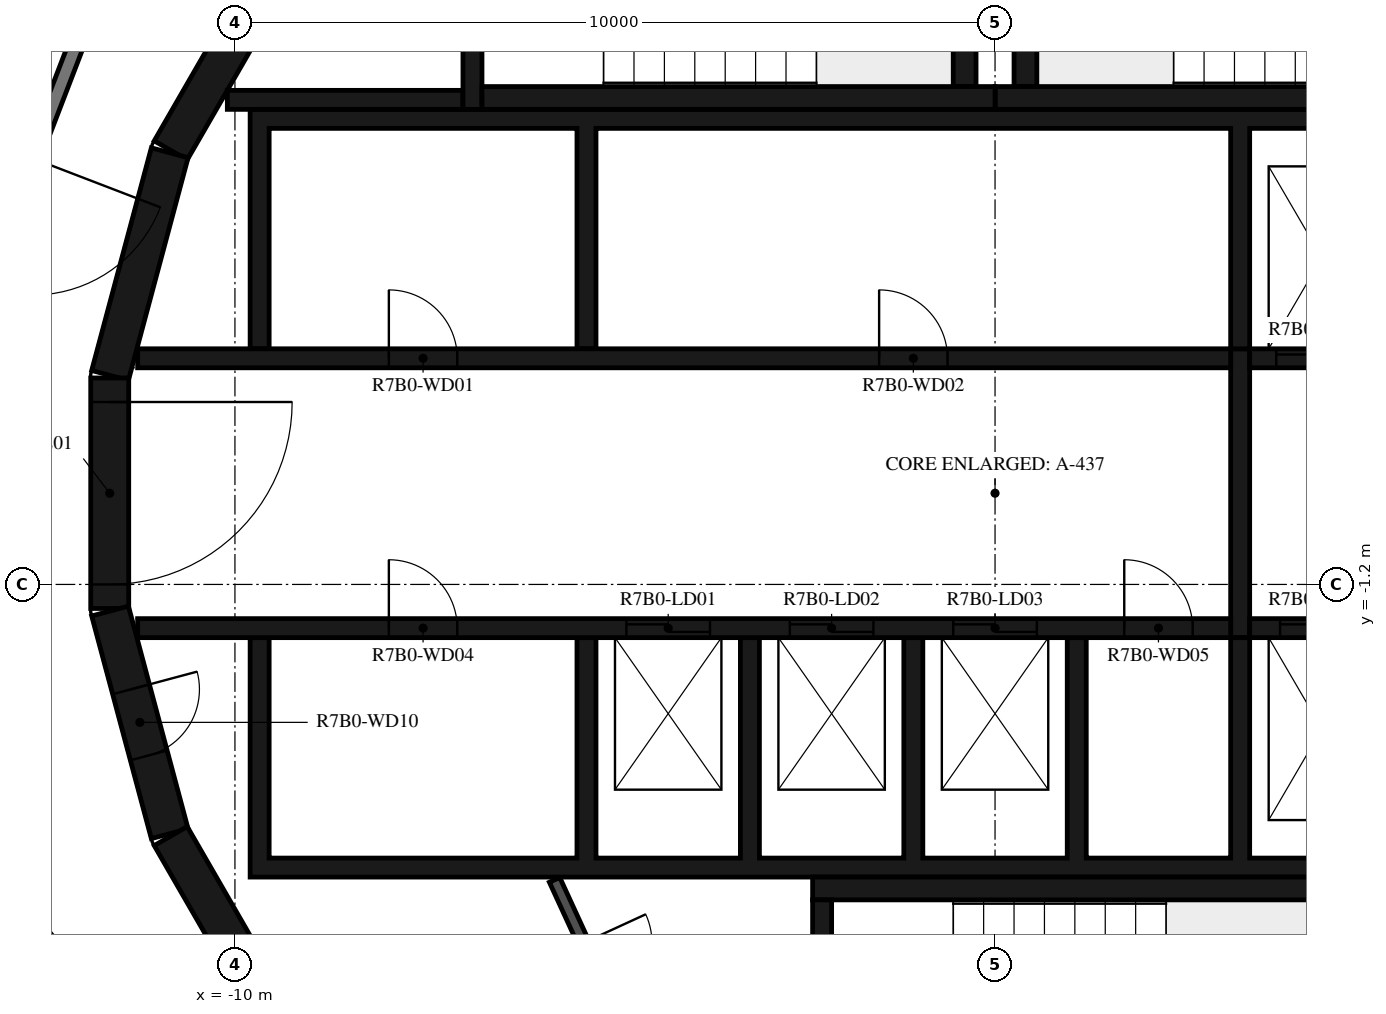
"""IFC4 building model, lengths in metres.
Left out: names, types, materials, properties, quantities, classifications, styles, units other than length and angle.
Written with IfcOpenShell. Run it as: python <this file> out.ifc"""

import sys

from ifc_helpers import new_model, si_unit, direction, frame, frame_2d, origin, place, context, subcontext, project, spatial, polyline, rectangle, outline, extrude, element, fill, save


model = new_model("IFC4")
c1 = context("Model", 3, precision=1e-05, world=origin(), true_north=direction((0.0, 1.0)))
c2 = subcontext(c1, "Body", "Model", "MODEL_VIEW")
j1 = project(units=[si_unit("LENGTHUNIT", "METRE"), si_unit("PLANEANGLEUNIT", "RADIAN")], contexts=[c1])
p1 = place(None, origin())
s1 = spatial("IfcSite", under=j1, at=p1, CompositionType="ELEMENT")
p2 = place(p1, origin())
s2 = spatial("IfcBuilding", under=s1, at=p2, CompositionType="ELEMENT")
p3 = place(p2, frame((0.0, 0.0, 277.4)))
s3 = spatial("IfcBuildingStorey", under=s2, at=p3, CompositionType="ELEMENT", Elevation=277.4)
for number, where, z_axis, x_axis in (
    (1, (-9.329, 7.137, 0.0), (0.0, 0.0, 1.0), (-0.5, -0.866, 0.0)),
    (2, (-10.858, 4.479, 0.0), (0.0, 0.0, 1.0), (-0.259, -0.966, 0.0)),
):
    element("IfcWall", number, at=place(p3, frame(where, z_axis=z_axis, x_axis=x_axis)), inside=s3, PredefinedType="SHEAR", context=c2, shape_type="SweptSolid", body=[
        extrude(rectangle(XDim=3.033, YDim=0.5, at=frame_2d((1.516, 0.0))), origin(), (0.0, 0.0, 1.0), 3.12),
    ])
p4 = place(p3, frame((-11.647, 1.516, 0.0), z_axis=(0.0, 0.0, 1.0), x_axis=(0.0, -1.0, 0.0)))
e3 = element("IfcWall", 3, at=p4, inside=s3, PredefinedType="SHEAR", context=c2, shape_type="SweptSolid", body=[
    extrude(rectangle(XDim=3.033, YDim=0.5, at=frame_2d((1.516, 0.0))), origin(), (0.0, 0.0, 1.0), 3.12),
])
p5 = place(p4, frame((0.316, 0.0, 0.0)))
e4 = element("IfcOpeningElement", 4, at=p5, cuts=e3, PredefinedType="OPENING", context=c2, shape_type="SweptSolid", body=[
    extrude(rectangle(XDim=2.4, YDim=2.1, at=frame_2d((1.2, 1.05))), frame((0.0, 0.26, 0.0), z_axis=(0.0, -1.0, 0.0), x_axis=(1.0, 0.0, 0.0)), (0.0, 0.0, 1.0), 0.52),
])
p6 = place(p3, frame((-11.643, -1.55, 0.0), z_axis=(0.0, 0.0, 1.0), x_axis=(0.258734743916, -0.965948410781, 0.0)))
e5 = element("IfcWall", 5, at=p6, inside=s3, PredefinedType="SHEAR", context=c2, shape_type="SweptSolid", body=[
    extrude(rectangle(XDim=3.033, YDim=0.5, at=frame_2d((1.516, 0.0))), origin(), (0.0, 0.0, 1.0), 3.12),
])
p7 = place(p6, frame((1.066, 0.0, 0.0)))
e6 = element("IfcOpeningElement", 6, at=p7, cuts=e5, PredefinedType="OPENING", context=c2, shape_type="SweptSolid", body=[
    extrude(rectangle(XDim=0.9, YDim=2.1, at=frame_2d((0.45, 1.05))), frame((0.0, 0.26, 0.0), z_axis=(0.0, -1.0, 0.0), x_axis=(1.0, 0.0, 0.0)), (0.0, 0.0, 1.0), 0.52),
])
p8 = place(p3, frame((-10.845, -4.51, 0.0), z_axis=(0.0, 0.0, 1.0), x_axis=(0.500087131594, -0.865975092491, 0.0)))
e7 = element("IfcWall", 7, at=p8, inside=s3, PredefinedType="SHEAR", context=c2, shape_type="SweptSolid", body=[
    extrude(rectangle(XDim=3.033, YDim=0.5, at=frame_2d((1.516, 0.0))), origin(), (0.0, 0.0, 1.0), 3.12),
])
p9 = place(p3, frame((0.0, 5.2, 0.0), z_axis=(0.0, 0.0, 1.0), x_axis=(1.0, 0.0, 0.0)))
e8 = element("IfcWall", 8, at=p9, inside=s3, PredefinedType="SHEAR", context=c2, shape_type="SweptSolid", body=[
    extrude(rectangle(XDim=6.75, YDim=0.3, at=frame_2d((3.375, 0.0))), origin(), (0.0, 0.0, 1.0), 3.12),
])
p10 = place(p3, frame((0.4, 5.35, 0.0), z_axis=(0.0, 0.0, 1.0), x_axis=(0.0, 1.0, 0.0)))
e9 = element("IfcWall", 9, at=p10, inside=s3, PredefinedType="SHEAR", context=c2, shape_type="SweptSolid", body=[
    extrude(rectangle(XDim=3.32, YDim=0.3, at=frame_2d((1.66, 0.0))), origin(), (0.0, 0.0, 1.0), 3.12),
])
p11 = place(p3, frame((-6.75, 5.2, 0.0), z_axis=(0.0, 0.0, 1.0), x_axis=(1.0, 0.0, 0.0)))
e10 = element("IfcWall", 10, at=p11, inside=s3, PredefinedType="SHEAR", context=c2, shape_type="SweptSolid", body=[
    extrude(rectangle(XDim=6.75, YDim=0.3, at=frame_2d((3.375, 0.0))), origin(), (0.0, 0.0, 1.0), 3.12),
])
p12 = place(p3, frame((-0.4, 5.35, 0.0), z_axis=(0.0, 0.0, 1.0), x_axis=(0.0, 1.0, 0.0)))
e11 = element("IfcWall", 11, at=p12, inside=s3, PredefinedType="SHEAR", context=c2, shape_type="SweptSolid", body=[
    extrude(rectangle(XDim=3.32, YDim=0.3, at=frame_2d((1.66, 0.0))), origin(), (0.0, 0.0, 1.0), 3.12),
])
p13 = place(p3, frame((-6.875, 8.97, 0.0), z_axis=(0.0, 0.0, 1.0), x_axis=(0.0, -1.0, 0.0)))
e12 = element("IfcWall", 12, at=p13, inside=s3, PredefinedType="SHEAR", context=c2, shape_type="SweptSolid", body=[
    extrude(rectangle(XDim=3.92, YDim=0.25, at=frame_2d((1.96, 0.0))), origin(), (0.0, 0.0, 1.0), 3.12),
])
p14 = place(p13, frame((1.61, 0.0, 0.0)))
e13 = element("IfcOpeningElement", 13, at=p14, cuts=e12, PredefinedType="OPENING", context=c2, shape_type="SweptSolid", body=[
    extrude(rectangle(XDim=1.2, YDim=2.1, at=frame_2d((0.6, 1.05))), frame((0.0, 0.135, 0.0), z_axis=(0.0, -1.0, 0.0), x_axis=(1.0, 0.0, 0.0)), (0.0, 0.0, 1.0), 0.27),
])
p15 = place(p3, frame((-7.0, 5.175, 0.0), z_axis=(0.0, 0.0, 1.0), x_axis=(-1.0, 0.0, 0.0)))
e14 = element("IfcWall", 14, at=p15, inside=s3, PredefinedType="SHEAR", context=c2, shape_type="SweptSolid", body=[
    extrude(rectangle(XDim=3.1, YDim=0.25, at=frame_2d((1.55, 0.0))), origin(), (0.0, 0.0, 1.0), 3.12),
])
p16 = place(p3, frame((-2.275, -8.67, 0.0), z_axis=(0.0, 0.0, 1.0), x_axis=(0.0, 1.0, 0.0)))
e15 = element("IfcWall", 15, at=p16, inside=s3, PredefinedType="SHEAR", context=c2, shape_type="SweptSolid", body=[
    extrude(rectangle(XDim=3.32, YDim=0.25, at=frame_2d((1.66, 0.0))), origin(), (0.0, 0.0, 1.0), 3.12),
])
p17 = place(p3, frame((-2.4, -5.2, 0.0), z_axis=(0.0, 0.0, 1.0), x_axis=(1.0, 0.0, 0.0)))
e16 = element("IfcWall", 16, at=p17, inside=s3, PredefinedType="SHEAR", context=c2, shape_type="SweptSolid", body=[
    extrude(rectangle(XDim=7.05, YDim=0.3, at=frame_2d((3.525, 0.0))), origin(), (0.0, 0.0, 1.0), 3.12),
])
p18 = place(p3, origin())
e17 = element("IfcWall", 17, at=p18, inside=s3, PredefinedType="SHEAR", context=c2, shape_type="SweptSolid", body=[
    extrude(outline(polyline([(-9.8, 1.9), (-9.55, 1.9), (-9.55, 4.8), (-5.5, 4.8), (-5.5, 1.9), (-5.25, 1.9), (-5.25, 4.8), (3.1, 4.8), (3.1, 1.9), (3.35, 1.9), (3.35, 4.8), (5.25, 4.8), (5.25, 1.9), (5.5, 1.9), (5.5, 4.8), (7.4, 4.8), (7.4, 1.9), (7.65, 1.9), (7.65, 4.8), (9.55, 4.8), (9.55, 1.9), (9.8, 1.9), (9.8, 4.8), (9.8, 5.05), (-9.8, 5.05), (-9.8, 4.8), (-9.8, 1.9)])), origin(), (0.0, 0.0, 1.0), 3.12),
])
p19 = place(p3, origin())
e18 = element("IfcWall", 18, at=p19, inside=s3, PredefinedType="SHEAR", context=c2, shape_type="SweptSolid", body=[
    extrude(outline(polyline([(9.8, -5.05), (9.8, -4.8), (9.8, -1.9), (9.55, -1.9), (9.55, -4.8), (7.65, -4.8), (7.65, -1.9), (7.4, -1.9), (7.4, -4.8), (5.5, -4.8), (5.5, -1.9), (5.25, -1.9), (5.25, -4.8), (3.35, -4.8), (3.35, -1.9), (3.1, -1.9), (3.1, -4.8), (1.2, -4.8), (1.2, -1.9), (0.95, -1.9), (0.95, -4.8), (-0.95, -4.8), (-0.95, -1.9), (-1.2, -1.9), (-1.2, -4.8), (-3.1, -4.8), (-3.1, -1.9), (-3.35, -1.9), (-3.35, -4.8), (-5.25, -4.8), (-5.25, -1.9), (-5.5, -1.9), (-5.5, -4.8), (-9.55, -4.8), (-9.55, -1.9), (-9.8, -1.9), (-9.8, -4.8), (-9.8, -5.05), (9.8, -5.05)])), origin(), (0.0, 0.0, 1.0), 3.12),
])
p20 = place(p3, frame((-11.28, 1.775, 0.0), z_axis=(0.0, 0.0, 1.0), x_axis=(1.0, 0.0, 0.0)))
e19 = element("IfcWall", 19, at=p20, inside=s3, PredefinedType="SHEAR", context=c2, shape_type="SweptSolid", body=[
    extrude(rectangle(XDim=14.38, YDim=0.25, at=frame_2d((7.19, 0.0))), origin(), (0.0, 0.0, 1.0), 3.12),
])
p21 = place(p20, frame((3.305, 0.0, 0.0)))
e20 = element("IfcOpeningElement", 20, at=p21, cuts=e19, PredefinedType="OPENING", context=c2, shape_type="SweptSolid", body=[
    extrude(rectangle(XDim=0.9, YDim=2.1, at=frame_2d((0.45, 1.05))), frame((0.0, 0.135, 0.0), z_axis=(0.0, -1.0, 0.0), x_axis=(1.0, 0.0, 0.0)), (0.0, 0.0, 1.0), 0.27),
])
p22 = place(p20, frame((9.755, 0.0, 0.0)))
e21 = element("IfcOpeningElement", 21, at=p22, cuts=e19, PredefinedType="OPENING", context=c2, shape_type="SweptSolid", body=[
    extrude(rectangle(XDim=0.9, YDim=2.1, at=frame_2d((0.45, 1.05))), frame((0.0, 0.135, 0.0), z_axis=(0.0, -1.0, 0.0), x_axis=(1.0, 0.0, 0.0)), (0.0, 0.0, 1.0), 0.27),
])
p23 = place(p3, frame((3.35, 1.775, 0.0), z_axis=(0.0, 0.0, 1.0), x_axis=(1.0, 0.0, 0.0)))
e22 = element("IfcWall", 22, at=p23, inside=s3, PredefinedType="SHEAR", context=c2, shape_type="SweptSolid", body=[
    extrude(rectangle(XDim=7.93, YDim=0.25, at=frame_2d((3.965, 0.0))), origin(), (0.0, 0.0, 1.0), 3.12),
])
p24 = place(p23, frame((0.35, 0.0, 0.0)))
e23 = element("IfcOpeningElement", 23, at=p24, cuts=e22, PredefinedType="OPENING", context=c2, shape_type="SweptSolid", body=[
    extrude(rectangle(XDim=1.2, YDim=2.4, at=frame_2d((0.6, 1.2))), frame((0.0, 0.135, 0.0), z_axis=(0.0, -1.0, 0.0), x_axis=(1.0, 0.0, 0.0)), (0.0, 0.0, 1.0), 0.27),
])
p25 = place(p23, frame((2.5, 0.0, 0.0)))
e24 = element("IfcOpeningElement", 24, at=p25, cuts=e22, PredefinedType="OPENING", context=c2, shape_type="SweptSolid", body=[
    extrude(rectangle(XDim=1.2, YDim=2.4, at=frame_2d((0.6, 1.2))), frame((0.0, 0.135, 0.0), z_axis=(0.0, -1.0, 0.0), x_axis=(1.0, 0.0, 0.0)), (0.0, 0.0, 1.0), 0.27),
])
p26 = place(p23, frame((4.8, 0.0, 0.0)))
e25 = element("IfcOpeningElement", 25, at=p26, cuts=e22, PredefinedType="OPENING", context=c2, shape_type="SweptSolid", body=[
    extrude(rectangle(XDim=0.9, YDim=2.1, at=frame_2d((0.45, 1.05))), frame((0.0, 0.135, 0.0), z_axis=(0.0, -1.0, 0.0), x_axis=(1.0, 0.0, 0.0)), (0.0, 0.0, 1.0), 0.27),
])
p27 = place(p3, frame((-11.28, -1.775, 0.0), z_axis=(0.0, 0.0, 1.0), x_axis=(1.0, 0.0, 0.0)))
e26 = element("IfcWall", 26, at=p27, inside=s3, PredefinedType="SHEAR", context=c2, shape_type="SweptSolid", body=[
    extrude(rectangle(XDim=14.38, YDim=0.25, at=frame_2d((7.19, 0.0))), origin(), (0.0, 0.0, 1.0), 3.12),
])
p28 = place(p27, frame((6.43, 0.0, 0.0)))
e27 = element("IfcOpeningElement", 27, at=p28, cuts=e26, PredefinedType="OPENING", context=c2, shape_type="SweptSolid", body=[
    extrude(rectangle(XDim=1.1, YDim=2.1, at=frame_2d((0.55, 1.05))), frame((0.0, 0.135, 0.0), z_axis=(0.0, -1.0, 0.0), x_axis=(1.0, 0.0, 0.0)), (0.0, 0.0, 1.0), 0.27),
])
p29 = place(p27, frame((8.58, 0.0, 0.0)))
e28 = element("IfcOpeningElement", 28, at=p29, cuts=e26, PredefinedType="OPENING", context=c2, shape_type="SweptSolid", body=[
    extrude(rectangle(XDim=1.1, YDim=2.1, at=frame_2d((0.55, 1.05))), frame((0.0, 0.135, 0.0), z_axis=(0.0, -1.0, 0.0), x_axis=(1.0, 0.0, 0.0)), (0.0, 0.0, 1.0), 0.27),
])
p30 = place(p27, frame((10.73, 0.0, 0.0)))
e29 = element("IfcOpeningElement", 29, at=p30, cuts=e26, PredefinedType="OPENING", context=c2, shape_type="SweptSolid", body=[
    extrude(rectangle(XDim=1.1, YDim=2.1, at=frame_2d((0.55, 1.05))), frame((0.0, 0.135, 0.0), z_axis=(0.0, -1.0, 0.0), x_axis=(1.0, 0.0, 0.0)), (0.0, 0.0, 1.0), 0.27),
])
p31 = place(p27, frame((3.305, 0.0, 0.0)))
e30 = element("IfcOpeningElement", 30, at=p31, cuts=e26, PredefinedType="OPENING", context=c2, shape_type="SweptSolid", body=[
    extrude(rectangle(XDim=0.9, YDim=2.1, at=frame_2d((0.45, 1.05))), frame((0.0, 0.135, 0.0), z_axis=(0.0, -1.0, 0.0), x_axis=(1.0, 0.0, 0.0)), (0.0, 0.0, 1.0), 0.27),
])
p32 = place(p27, frame((12.98, 0.0, 0.0)))
e31 = element("IfcOpeningElement", 31, at=p32, cuts=e26, PredefinedType="OPENING", context=c2, shape_type="SweptSolid", body=[
    extrude(rectangle(XDim=0.9, YDim=2.1, at=frame_2d((0.45, 1.05))), frame((0.0, 0.135, 0.0), z_axis=(0.0, -1.0, 0.0), x_axis=(1.0, 0.0, 0.0)), (0.0, 0.0, 1.0), 0.27),
])
p33 = place(p3, frame((3.35, -1.775, 0.0), z_axis=(0.0, 0.0, 1.0), x_axis=(1.0, 0.0, 0.0)))
e32 = element("IfcWall", 32, at=p33, inside=s3, PredefinedType="SHEAR", context=c2, shape_type="SweptSolid", body=[
    extrude(rectangle(XDim=7.93, YDim=0.25, at=frame_2d((3.965, 0.0))), origin(), (0.0, 0.0, 1.0), 3.12),
])
p34 = place(p33, frame((0.4, 0.0, 0.0)))
e33 = element("IfcOpeningElement", 33, at=p34, cuts=e32, PredefinedType="OPENING", context=c2, shape_type="SweptSolid", body=[
    extrude(rectangle(XDim=1.1, YDim=2.4, at=frame_2d((0.55, 1.2))), frame((0.0, 0.135, 0.0), z_axis=(0.0, -1.0, 0.0), x_axis=(1.0, 0.0, 0.0)), (0.0, 0.0, 1.0), 0.27),
])
p35 = place(p33, frame((2.55, 0.0, 0.0)))
e34 = element("IfcOpeningElement", 34, at=p35, cuts=e32, PredefinedType="OPENING", context=c2, shape_type="SweptSolid", body=[
    extrude(rectangle(XDim=1.1, YDim=2.4, at=frame_2d((0.55, 1.2))), frame((0.0, 0.135, 0.0), z_axis=(0.0, -1.0, 0.0), x_axis=(1.0, 0.0, 0.0)), (0.0, 0.0, 1.0), 0.27),
])
p36 = place(p33, frame((4.7, 0.0, 0.0)))
e35 = element("IfcOpeningElement", 35, at=p36, cuts=e32, PredefinedType="OPENING", context=c2, shape_type="SweptSolid", body=[
    extrude(rectangle(XDim=1.1, YDim=2.4, at=frame_2d((0.55, 1.2))), frame((0.0, 0.135, 0.0), z_axis=(0.0, -1.0, 0.0), x_axis=(1.0, 0.0, 0.0)), (0.0, 0.0, 1.0), 0.27),
])
p37 = place(p3, frame((3.225, -1.9, 0.0), z_axis=(0.0, 0.0, 1.0), x_axis=(0.0, 1.0, 0.0)))
e36 = element("IfcWall", 36, at=p37, inside=s3, PredefinedType="SHEAR", context=c2, shape_type="SweptSolid", body=[
    extrude(rectangle(XDim=3.8, YDim=0.25, at=frame_2d((1.9, 0.0))), origin(), (0.0, 0.0, 1.0), 3.12),
])
p38 = place(p3, frame((-5.795, -5.086, 0.0), z_axis=(0.0, 0.0, 1.0), x_axis=(0.417887867606, -0.908498613157, 0.0)))
e37 = element("IfcWall", 37, at=p38, inside=s3, PredefinedType="PARTITIONING", context=c2, shape_type="SweptSolid", body=[
    extrude(rectangle(XDim=2.726, YDim=0.15, at=frame_2d((1.363, 0.0))), origin(), (0.0, 0.0, 1.0), 3.12),
])
p39 = place(p38, frame((0.913, 0.0, 0.0)))
e38 = element("IfcOpeningElement", 38, at=p39, cuts=e37, PredefinedType="OPENING", context=c2, shape_type="SweptSolid", body=[
    extrude(rectangle(XDim=0.9, YDim=2.1, at=frame_2d((0.45, 1.05))), frame((0.0, 0.085, 0.0), z_axis=(0.0, -1.0, 0.0), x_axis=(1.0, 0.0, 0.0)), (0.0, 0.0, 1.0), 0.17),
])
p40 = place(p3, frame((-11.223, 8.154, 0.0), z_axis=(0.0, 0.0, 1.0), x_axis=(-0.358341090983, -0.93359073609, 0.0)))
e39 = element("IfcWall", 39, at=p40, inside=s3, PredefinedType="STANDARD", context=c2, shape_type="SweptSolid", body=[
    extrude(rectangle(XDim=7.181, YDim=0.2, at=frame_2d((3.59, 0.0))), origin(), (0.0, 0.0, 1.0), 3.12),
])
p41 = place(p40, frame((4.014, 0.0, 0.0)))
e40 = element("IfcOpeningElement", 40, at=p41, cuts=e39, PredefinedType="OPENING", context=c2, shape_type="SweptSolid", body=[
    extrude(rectangle(XDim=1.8, YDim=2.1, at=frame_2d((0.9, 1.05))), frame((0.0, 0.11, 0.0), z_axis=(0.0, -1.0, 0.0), x_axis=(1.0, 0.0, 0.0)), (0.0, 0.0, 1.0), 0.22),
])
p42 = place(p3, frame((-12.673, -5.643, 0.0), z_axis=(0.0, 0.0, 1.0), x_axis=(0.629302871585, -0.777160148113, 0.0)))
e41 = element("IfcWall", 41, at=p42, inside=s3, PredefinedType="STANDARD", context=c2, shape_type="SweptSolid", body=[
    extrude(rectangle(XDim=7.181, YDim=0.2, at=frame_2d((3.59, 0.0))), origin(), (0.0, 0.0, 1.0), 3.12),
])
p43 = place(p5, origin())
e42 = element("IfcDoor", 42, at=p43, inside=s3, OperationType="DOUBLE_DOOR_SINGLE_SWING", PredefinedType="DOOR", context=c2, shape_type="SweptSolid", body=[
    extrude(rectangle(XDim=2.4, YDim=2.1, at=frame_2d((1.2, 1.05))), frame((0.0, 0.025, 0.0), z_axis=(0.0, -1.0, 0.0), x_axis=(1.0, 0.0, 0.0)), (0.0, 0.0, 1.0), 0.05),
])
fill(e4, e42)
p44 = place(p24, origin())
e43 = element("IfcDoor", 43, at=p44, inside=s3, OperationType="DOUBLE_DOOR_SLIDING", PredefinedType="DOOR", context=c2, shape_type="SweptSolid", body=[
    extrude(rectangle(XDim=1.2, YDim=2.4, at=frame_2d((0.6, 1.2))), frame((0.0, 0.025, 0.0), z_axis=(0.0, -1.0, 0.0), x_axis=(1.0, 0.0, 0.0)), (0.0, 0.0, 1.0), 0.05),
])
fill(e23, e43)
p45 = place(p28, origin())
e44 = element("IfcDoor", 44, at=p45, inside=s3, OperationType="DOUBLE_DOOR_SLIDING", PredefinedType="DOOR", context=c2, shape_type="SweptSolid", body=[
    extrude(rectangle(XDim=1.1, YDim=2.1, at=frame_2d((0.55, 1.05))), frame((0.0, 0.025, 0.0), z_axis=(0.0, -1.0, 0.0), x_axis=(1.0, 0.0, 0.0)), (0.0, 0.0, 1.0), 0.05),
])
fill(e27, e44)
p46 = place(p29, origin())
e45 = element("IfcDoor", 45, at=p46, inside=s3, OperationType="DOUBLE_DOOR_SLIDING", PredefinedType="DOOR", context=c2, shape_type="SweptSolid", body=[
    extrude(rectangle(XDim=1.1, YDim=2.1, at=frame_2d((0.55, 1.05))), frame((0.0, 0.025, 0.0), z_axis=(0.0, -1.0, 0.0), x_axis=(1.0, 0.0, 0.0)), (0.0, 0.0, 1.0), 0.05),
])
fill(e28, e45)
p47 = place(p30, origin())
e46 = element("IfcDoor", 46, at=p47, inside=s3, OperationType="DOUBLE_DOOR_SLIDING", PredefinedType="DOOR", context=c2, shape_type="SweptSolid", body=[
    extrude(rectangle(XDim=1.1, YDim=2.1, at=frame_2d((0.55, 1.05))), frame((0.0, 0.025, 0.0), z_axis=(0.0, -1.0, 0.0), x_axis=(1.0, 0.0, 0.0)), (0.0, 0.0, 1.0), 0.05),
])
fill(e29, e46)
p48 = place(p34, origin())
e47 = element("IfcDoor", 47, at=p48, inside=s3, OperationType="DOUBLE_DOOR_SLIDING", PredefinedType="DOOR", context=c2, shape_type="SweptSolid", body=[
    extrude(rectangle(XDim=1.1, YDim=2.4, at=frame_2d((0.55, 1.2))), frame((0.0, 0.025, 0.0), z_axis=(0.0, -1.0, 0.0), x_axis=(1.0, 0.0, 0.0)), (0.0, 0.0, 1.0), 0.05),
])
fill(e33, e47)
p49 = place(p21, origin())
e48 = element("IfcDoor", 48, at=p49, inside=s3, OperationType="SINGLE_SWING_LEFT", PredefinedType="DOOR", context=c2, shape_type="SweptSolid", body=[
    extrude(rectangle(XDim=0.9, YDim=2.1, at=frame_2d((0.45, 1.05))), frame((0.0, 0.025, 0.0), z_axis=(0.0, -1.0, 0.0), x_axis=(1.0, 0.0, 0.0)), (0.0, 0.0, 1.0), 0.05),
])
fill(e20, e48)
p50 = place(p22, origin())
e49 = element("IfcDoor", 49, at=p50, inside=s3, OperationType="SINGLE_SWING_RIGHT", PredefinedType="DOOR", context=c2, shape_type="SweptSolid", body=[
    extrude(rectangle(XDim=0.9, YDim=2.1, at=frame_2d((0.45, 1.05))), frame((0.0, 0.025, 0.0), z_axis=(0.0, -1.0, 0.0), x_axis=(1.0, 0.0, 0.0)), (0.0, 0.0, 1.0), 0.05),
])
fill(e21, e49)
p51 = place(p31, origin())
e50 = element("IfcDoor", 50, at=p51, inside=s3, OperationType="SINGLE_SWING_RIGHT", PredefinedType="DOOR", context=c2, shape_type="SweptSolid", body=[
    extrude(rectangle(XDim=0.9, YDim=2.1, at=frame_2d((0.45, 1.05))), frame((0.0, 0.025, 0.0), z_axis=(0.0, -1.0, 0.0), x_axis=(1.0, 0.0, 0.0)), (0.0, 0.0, 1.0), 0.05),
])
fill(e30, e50)
p52 = place(p32, origin())
e51 = element("IfcDoor", 51, at=p52, inside=s3, OperationType="SINGLE_SWING_LEFT", PredefinedType="DOOR", context=c2, shape_type="SweptSolid", body=[
    extrude(rectangle(XDim=0.9, YDim=2.1, at=frame_2d((0.45, 1.05))), frame((0.0, 0.025, 0.0), z_axis=(0.0, -1.0, 0.0), x_axis=(1.0, 0.0, 0.0)), (0.0, 0.0, 1.0), 0.05),
])
fill(e31, e51)
p53 = place(p7, origin())
e52 = element("IfcDoor", 52, at=p53, inside=s3, OperationType="SINGLE_SWING_RIGHT", PredefinedType="DOOR", context=c2, shape_type="SweptSolid", body=[
    extrude(rectangle(XDim=0.9, YDim=2.1, at=frame_2d((0.45, 1.05))), frame((0.0, 0.025, 0.0), z_axis=(0.0, -1.0, 0.0), x_axis=(1.0, 0.0, 0.0)), (0.0, 0.0, 1.0), 0.05),
])
fill(e6, e52)
save(model, sys.argv[1])
